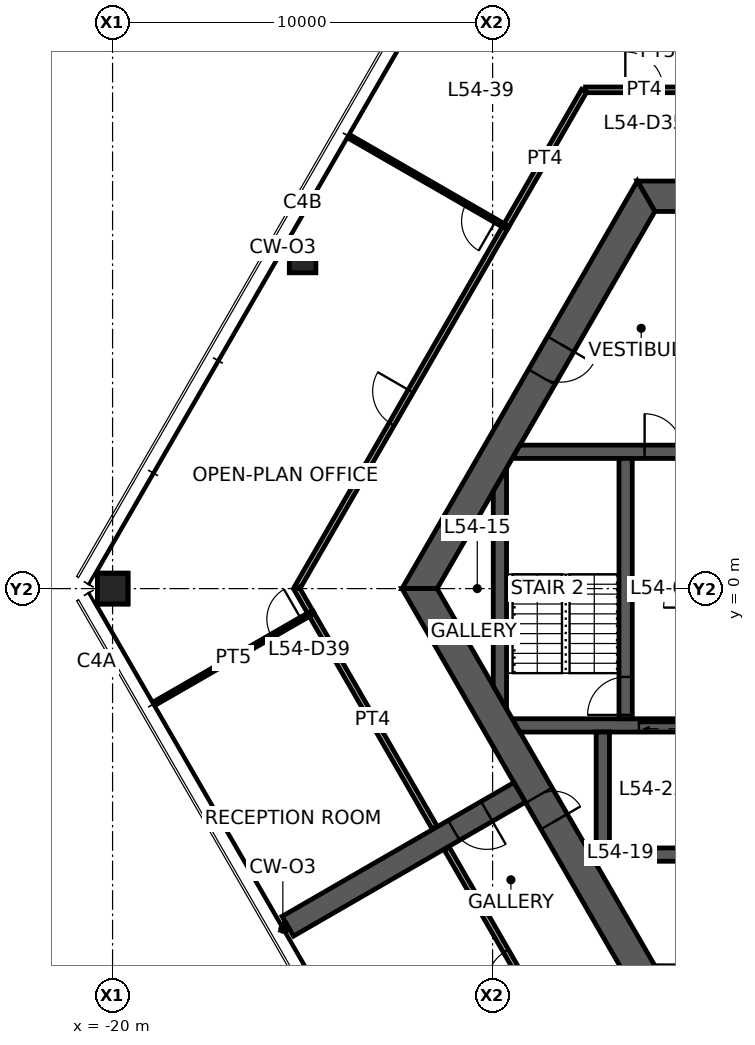
"""IFC4 building model, lengths in metres.
Left out: names, types, materials, properties, quantities, classifications, styles, units other than length and angle.
Written with IfcOpenShell. Run it as: python <this file> out.ifc"""

import sys

from ifc_helpers import new_model, si_unit, direction, frame, frame_2d, origin, origin_2d, place, context, subcontext, project, spatial, polyline, rectangle, hollow_rectangle, outline, extrude, element, fill, save


model = new_model("IFC4")
c1 = context("Model", 3, precision=1e-05, world=origin(), true_north=direction((0.0, 1.0)))
c2 = subcontext(c1, "Body", "Model", "MODEL_VIEW")
j1 = project(units=[si_unit("LENGTHUNIT", "METRE"), si_unit("PLANEANGLEUNIT", "RADIAN")], contexts=[c1])
p1 = place(None, origin())
s1 = spatial("IfcSite", under=j1, at=p1, CompositionType="ELEMENT")
p2 = place(p1, origin())
s2 = spatial("IfcBuilding", under=s1, at=p2, CompositionType="ELEMENT")
p3 = place(p2, frame((0.0, 0.0, 216.7)))
s3 = spatial("IfcBuildingStorey", under=s2, at=p3, CompositionType="ELEMENT", Elevation=216.7)
p4 = place(p3, frame((-20.0, 0.0, 0.0), z_axis=(0.0, 0.0, 1.0), x_axis=(1.0, 0.0, 0.0)))
e1 = element("IfcColumn", 1, at=p4, inside=s3, PredefinedType="COLUMN", context=c2, shape_type="SweptSolid", body=[
    extrude(hollow_rectangle(XDim=0.8, YDim=0.8, WallThickness=0.04, at=origin_2d()), origin(), (0.0, 0.0, 1.0), 3.9),
])
p5 = place(p3, frame((-15.0, 8.66, 0.0), z_axis=(0.0, 0.0, 1.0), x_axis=(1.0, 0.0, 0.0)))
e2 = element("IfcColumn", 2, at=p5, inside=s3, PredefinedType="COLUMN", context=c2, shape_type="SweptSolid", body=[
    extrude(hollow_rectangle(XDim=0.7, YDim=0.7, WallThickness=0.032, at=origin_2d()), origin(), (0.0, 0.0, 1.0), 3.9),
])
p6 = place(p3, frame((5.961, 10.325, 0.0), z_axis=(0.0, 0.0, 1.0), x_axis=(-1.0, 0.0, 0.0)))
e3 = element("IfcWall", 3, at=p6, inside=s3, PredefinedType="SHEAR", context=c2, shape_type="SweptSolid", body=[
    extrude(outline(polyline([(-0.231, -0.4), (4.649, -0.4), (5.549, -0.4), (6.374, -0.4), (7.273, -0.4), (12.153, -0.4), (11.691, 0.4), (7.273, 0.4), (6.374, 0.4), (5.549, 0.4), (4.649, 0.4), (0.231, 0.4), (-0.231, -0.4)])), origin(), (0.0, 0.0, 1.0), 3.9),
])
p7 = place(p6, frame((6.374, 0.0, 0.0)))
e4 = element("IfcOpeningElement", 4, at=p7, cuts=e3, PredefinedType="OPENING", context=c2, shape_type="SweptSolid", body=[
    extrude(rectangle(XDim=0.9, YDim=2.1, at=frame_2d((0.45, 1.05))), frame((0.0, 0.41, 0.0), z_axis=(0.0, -1.0, 0.0), x_axis=(1.0, 0.0, 0.0)), (0.0, 0.0, 1.0), 0.82),
])
p8 = place(p6, frame((4.649, 0.0, 0.0)))
e5 = element("IfcOpeningElement", 5, at=p8, cuts=e3, PredefinedType="OPENING", context=c2, shape_type="SweptSolid", body=[
    extrude(rectangle(XDim=0.9, YDim=2.1, at=frame_2d((0.45, 1.05))), frame((0.0, 0.41, 0.0), z_axis=(0.0, -1.0, 0.0), x_axis=(1.0, 0.0, 0.0)), (0.0, 0.0, 1.0), 0.82),
])
p9 = place(p3, frame((-5.961, 10.325, 0.0), z_axis=(0.0, 0.0, 1.0), x_axis=(-0.500004296715, -0.866022923061, 0.0)))
e6 = element("IfcWall", 6, at=p9, inside=s3, PredefinedType="SHEAR", context=c2, shape_type="SweptSolid", body=[
    extrude(outline(polyline([(-0.231, -0.4), (4.494, -0.4), (5.494, -0.4), (12.153, -0.4), (11.691, 0.4), (5.494, 0.4), (4.494, 0.4), (0.231, 0.4), (-0.231, -0.4)])), origin(), (0.0, 0.0, 1.0), 3.9),
])
p10 = place(p9, frame((4.494, 0.0, 0.0)))
e7 = element("IfcOpeningElement", 7, at=p10, cuts=e6, PredefinedType="OPENING", context=c2, shape_type="SweptSolid", body=[
    extrude(rectangle(XDim=1.0, YDim=2.1, at=frame_2d((0.5, 1.05))), frame((0.0, 0.41, 0.0), z_axis=(0.0, -1.0, 0.0), x_axis=(1.0, 0.0, 0.0)), (0.0, 0.0, 1.0), 0.82),
])
p11 = place(p3, frame((-11.922, 0.0, 0.0), z_axis=(0.0, 0.0, 1.0), x_axis=(0.500004296715, -0.866022923061, 0.0)))
e8 = element("IfcWall", 8, at=p11, inside=s3, PredefinedType="SHEAR", context=c2, shape_type="SweptSolid", body=[
    extrude(outline(polyline([(-0.231, -0.4), (6.281, -0.4), (7.081, -0.4), (12.153, -0.4), (11.691, 0.4), (7.081, 0.4), (6.281, 0.4), (0.231, 0.4), (-0.231, -0.4)])), origin(), (0.0, 0.0, 1.0), 3.9),
])
p12 = place(p11, frame((6.281, 0.0, 0.0)))
e9 = element("IfcOpeningElement", 9, at=p12, cuts=e8, PredefinedType="OPENING", context=c2, shape_type="SweptSolid", body=[
    extrude(rectangle(XDim=0.8, YDim=2.1, at=frame_2d((0.4, 1.05))), frame((0.0, 0.41, 0.0), z_axis=(0.0, -1.0, 0.0), x_axis=(1.0, 0.0, 0.0)), (0.0, 0.0, 1.0), 0.82),
])
p13 = place(p3, frame((-9.288, -5.363, 0.0), z_axis=(0.0, 0.0, 1.0), x_axis=(-0.866027473358, -0.499996415376, 0.0)))
e10 = element("IfcWall", 10, at=p13, inside=s3, PredefinedType="SHEAR", context=c2, shape_type="SweptSolid", body=[
    extrude(rectangle(XDim=7.045, YDim=0.6, at=frame_2d((3.523, 0.0))), origin(), (0.0, 0.0, 1.0), 3.9),
])
p14 = place(p13, frame((1.0, 0.0, 0.0)))
e11 = element("IfcOpeningElement", 11, at=p14, cuts=e10, PredefinedType="OPENING", context=c2, shape_type="SweptSolid", body=[
    extrude(rectangle(XDim=1.0, YDim=2.1, at=frame_2d((0.5, 1.05))), frame((0.0, 0.31, 0.0), z_axis=(0.0, -1.0, 0.0), x_axis=(1.0, 0.0, 0.0)), (0.0, 0.0, 1.0), 0.62),
])
p15 = place(p3, frame((-9.382, 3.6, 0.0), z_axis=(0.0, 0.0, 1.0), x_axis=(1.0, 0.0, 0.0)))
e12 = element("IfcWall", 12, at=p15, inside=s3, PredefinedType="SHEAR", context=c2, shape_type="SweptSolid", body=[
    extrude(outline(polyline([(-0.101, -0.175), (3.382, -0.175), (4.382, -0.175), (5.782, -0.175), (6.882, -0.175), (7.957, -0.175), (7.957, 0.175), (6.882, 0.175), (5.782, 0.175), (4.382, 0.175), (3.382, 0.175), (0.101, 0.175), (-0.101, -0.175)])), origin(), (0.0, 0.0, 1.0), 3.9),
])
p16 = place(p15, frame((3.382, 0.0, 0.0)))
e13 = element("IfcOpeningElement", 13, at=p16, cuts=e12, PredefinedType="OPENING", context=c2, shape_type="SweptSolid", body=[
    extrude(rectangle(XDim=1.0, YDim=2.1, at=frame_2d((0.5, 1.05))), frame((0.0, 0.185, 0.0), z_axis=(0.0, -1.0, 0.0), x_axis=(1.0, 0.0, 0.0)), (0.0, 0.0, 1.0), 0.37),
])
p17 = place(p15, frame((5.782, 0.0, 0.0)))
e14 = element("IfcOpeningElement", 14, at=p17, cuts=e12, PredefinedType="OPENING", context=c2, shape_type="SweptSolid", body=[
    extrude(rectangle(XDim=1.1, YDim=2.1, at=frame_2d((0.55, 1.05))), frame((0.0, 0.185, 0.0), z_axis=(0.0, -1.0, 0.0), x_axis=(1.0, 0.0, 0.0)), (0.0, 0.0, 1.0), 0.37),
])
p18 = place(p3, frame((-9.382, -3.6, 0.0), z_axis=(0.0, 0.0, 1.0), x_axis=(1.0, 0.0, 0.0)))
e15 = element("IfcWall", 15, at=p18, inside=s3, PredefinedType="SHEAR", context=c2, shape_type="SweptSolid", body=[
    extrude(outline(polyline([(0.101, -0.175), (3.232, -0.175), (4.532, -0.175), (5.782, -0.175), (6.882, -0.175), (7.957, -0.175), (7.957, 0.175), (6.882, 0.175), (5.782, 0.175), (4.532, 0.175), (3.232, 0.175), (-0.101, 0.175), (0.101, -0.175)])), origin(), (0.0, 0.0, 1.0), 3.9),
])
p19 = place(p18, frame((5.782, 0.0, 0.0)))
e16 = element("IfcOpeningElement", 16, at=p19, cuts=e15, PredefinedType="OPENING", context=c2, shape_type="SweptSolid", body=[
    extrude(rectangle(XDim=1.1, YDim=2.1, at=frame_2d((0.55, 1.05))), frame((0.0, 0.185, 0.0), z_axis=(0.0, -1.0, 0.0), x_axis=(1.0, 0.0, 0.0)), (0.0, 0.0, 1.0), 0.37),
])
p20 = place(p18, frame((3.232, 0.0, 0.0)))
e17 = element("IfcOpeningElement", 17, at=p20, cuts=e15, PredefinedType="OPENING", context=c2, shape_type="SweptSolid", body=[
    extrude(rectangle(XDim=1.3, YDim=2.1, at=frame_2d((0.65, 1.05))), frame((0.0, 0.185, 0.0), z_axis=(0.0, -1.0, 0.0), x_axis=(1.0, 0.0, 0.0)), (0.0, 0.0, 1.0), 0.37),
])
p21 = place(p3, frame((-6.5, -3.425, 0.0), z_axis=(0.0, 0.0, 1.0), x_axis=(0.0, 1.0, 0.0)))
e18 = element("IfcWall", 18, at=p21, inside=s3, PredefinedType="SHEAR", context=c2, shape_type="SweptSolid", body=[
    extrude(rectangle(XDim=6.85, YDim=0.35, at=frame_2d((3.425, 0.0))), origin(), (0.0, 0.0, 1.0), 3.9),
])
p22 = place(p21, frame((0.1, 0.0, 0.0)))
e19 = element("IfcOpeningElement", 19, at=p22, cuts=e18, PredefinedType="OPENING", context=c2, shape_type="SweptSolid", body=[
    extrude(rectangle(XDim=1.0, YDim=2.1, at=frame_2d((0.5, 1.05))), frame((0.0, 0.185, 0.0), z_axis=(0.0, -1.0, 0.0), x_axis=(1.0, 0.0, 0.0)), (0.0, 0.0, 1.0), 0.37),
])
p23 = place(p3, frame((-7.275, -7.0, 0.0), z_axis=(0.0, 0.0, 1.0), x_axis=(1.0, 0.0, 0.0)))
e20 = element("IfcWall", 20, at=p23, inside=s3, PredefinedType="SHEAR", context=c2, shape_type="SweptSolid", body=[
    extrude(rectangle(XDim=2.6, YDim=0.35, at=frame_2d((1.3, 0.0))), origin(), (0.0, 0.0, 1.0), 3.9),
])
p24 = place(p3, frame((-7.1, -3.775, 0.0), z_axis=(0.0, 0.0, 1.0), x_axis=(0.0, -1.0, 0.0)))
e21 = element("IfcWall", 21, at=p24, inside=s3, PredefinedType="SHEAR", context=c2, shape_type="SweptSolid", body=[
    extrude(rectangle(XDim=3.05, YDim=0.35, at=frame_2d((1.525, 0.0))), origin(), (0.0, 0.0, 1.0), 3.9),
])
p25 = place(p3, frame((-9.808, -2.862, 0.0), z_axis=(0.0, 0.0, 1.0), x_axis=(0.0, 1.0, 0.0)))
e22 = element("IfcWall", 22, at=p25, inside=s3, PredefinedType="SHEAR", context=c2, shape_type="SweptSolid", body=[
    extrude(outline(polyline([(-0.303, -0.175), (6.028, -0.175), (5.421, 0.175), (0.303, 0.175), (-0.303, -0.175)])), origin(), (0.0, 0.0, 1.0), 3.9),
])
p26 = place(p3, frame((-7.555, 13.125, 0.0), z_axis=(0.0, 0.0, 1.0), x_axis=(1.0, 0.0, 0.0)))
e23 = element("IfcWall", 23, at=p26, inside=s3, PredefinedType="PARTITIONING", context=c2, shape_type="SweptSolid", body=[
    extrude(rectangle(XDim=3.094, YDim=0.15, at=frame_2d((1.547, 0.0))), origin(), (0.0, 0.0, 1.0), 2.95),
])
p27 = place(p26, frame((1.047, 0.0, 0.0)))
e24 = element("IfcOpeningElement", 24, at=p27, cuts=e23, PredefinedType="OPENING", context=c2, shape_type="SweptSolid", body=[
    extrude(rectangle(XDim=1.0, YDim=2.1, at=frame_2d((0.5, 1.05))), frame((0.0, 0.085, 0.0), z_axis=(0.0, -1.0, 0.0), x_axis=(1.0, 0.0, 0.0)), (0.0, 0.0, 1.0), 0.17),
])
p28 = place(p3, frame((-9.661, 9.516, 0.0), z_axis=(0.0, 0.0, 1.0), x_axis=(0.499997836828, 0.866026652689, 0.0)))
e25 = element("IfcWall", 25, at=p28, inside=s3, PredefinedType="PARTITIONING", context=c2, shape_type="SweptSolid", body=[
    extrude(rectangle(XDim=4.144, YDim=0.15, at=frame_2d((2.072, 0.0))), origin(), (0.0, 0.0, 1.0), 2.95),
])
p29 = place(p3, frame((-11.527, -6.285, 0.0), z_axis=(0.0, 0.0, 1.0), x_axis=(-0.500003537243, 0.866023361547, 0.0)))
e26 = element("IfcWall", 26, at=p29, inside=s3, PredefinedType="PARTITIONING", context=c2, shape_type="SweptSolid", body=[
    extrude(rectangle(XDim=6.516, YDim=0.15, at=frame_2d((3.258, 0.0))), origin(), (0.0, 0.0, 1.0), 2.95),
])
p30 = place(p3, frame((-15.156, 0.0, 0.0), z_axis=(0.0, 0.0, 1.0), x_axis=(0.500006847747, 0.8660214502, 0.0)))
e27 = element("IfcWall", 27, at=p30, inside=s3, PredefinedType="PARTITIONING", context=c2, shape_type="SweptSolid", body=[
    extrude(rectangle(XDim=10.998, YDim=0.15, at=frame_2d((5.499, 0.0))), origin(), (0.0, 0.0, 1.0), 2.95),
])
p31 = place(p30, frame((4.999, 0.0, 0.0)))
e28 = element("IfcOpeningElement", 28, at=p31, cuts=e27, PredefinedType="OPENING", context=c2, shape_type="SweptSolid", body=[
    extrude(rectangle(XDim=1.0, YDim=2.1, at=frame_2d((0.5, 1.05))), frame((0.0, 0.085, 0.0), z_axis=(0.0, -1.0, 0.0), x_axis=(1.0, 0.0, 0.0)), (0.0, 0.0, 1.0), 0.17),
])
p32 = place(p3, frame((-14.78, -0.651, 0.0), z_axis=(0.0, 0.0, 1.0), x_axis=(-0.500088105676, 0.865974529972, 0.0)))
e29 = element("IfcWall", 29, at=p32, inside=s3, PredefinedType="PARTITIONING", context=c2, shape_type="SweptSolid", body=[
    extrude(rectangle(XDim=0.751, YDim=0.15, at=frame_2d((0.375, 0.0))), origin(), (0.0, 0.0, 1.0), 2.95),
])
p33 = place(p3, frame((-9.656, 9.524, 0.0), z_axis=(0.0, 0.0, 1.0), x_axis=(-0.866526579402, 0.499130931911, 0.0)))
e30 = element("IfcWall", 30, at=p33, inside=s3, PredefinedType="PARTITIONING", context=c2, shape_type="SweptSolid", body=[
    extrude(rectangle(XDim=4.705, YDim=0.1, at=frame_2d((2.353, 0.0))), origin(), (0.0, 0.0, 1.0), 2.95),
])
p34 = place(p33, frame((0.3, 0.0, 0.0)))
e31 = element("IfcOpeningElement", 31, at=p34, cuts=e30, PredefinedType="OPENING", context=c2, shape_type="SweptSolid", body=[
    extrude(rectangle(XDim=0.9, YDim=2.1, at=frame_2d((0.45, 1.05))), frame((0.0, 0.06, 0.0), z_axis=(0.0, -1.0, 0.0), x_axis=(1.0, 0.0, 0.0)), (0.0, 0.0, 1.0), 0.12),
])
p35 = place(p3, frame((-18.857, -3.0, 0.0), z_axis=(0.0, 0.0, 1.0), x_axis=(0.866504138439, 0.499169888984, 0.0)))
e32 = element("IfcWall", 32, at=p35, inside=s3, PredefinedType="PARTITIONING", context=c2, shape_type="SweptSolid", body=[
    extrude(rectangle(XDim=4.706, YDim=0.1, at=frame_2d((2.353, 0.0))), origin(), (0.0, 0.0, 1.0), 2.95),
])
p36 = place(p35, frame((3.506, 0.0, 0.0)))
e33 = element("IfcOpeningElement", 33, at=p36, cuts=e32, PredefinedType="OPENING", context=c2, shape_type="SweptSolid", body=[
    extrude(rectangle(XDim=0.9, YDim=2.1, at=frame_2d((0.45, 1.05))), frame((0.0, 0.06, 0.0), z_axis=(0.0, -1.0, 0.0), x_axis=(1.0, 0.0, 0.0)), (0.0, 0.0, 1.0), 0.12),
])
p37 = place(p3, frame((-7.589, -13.105, 0.0), z_axis=(0.0, 0.0, 1.0), x_axis=(-0.499986333712, 0.866033293876, 0.0)))
e34 = element("IfcWall", 34, at=p37, inside=s3, PredefinedType="PARTITIONING", context=c2, shape_type="SweptSolid", body=[
    extrude(rectangle(XDim=7.235, YDim=0.15, at=frame_2d((3.617, 0.0))), origin(), (0.0, 0.0, 1.0), 2.95),
])
p38 = place(p37, frame((3.117, 0.0, 0.0)))
e35 = element("IfcOpeningElement", 35, at=p38, cuts=e34, PredefinedType="OPENING", context=c2, shape_type="SweptSolid", body=[
    extrude(rectangle(XDim=1.0, YDim=2.1, at=frame_2d((0.5, 1.05))), frame((0.0, 0.085, 0.0), z_axis=(0.0, -1.0, 0.0), x_axis=(1.0, 0.0, 0.0)), (0.0, 0.0, 1.0), 0.17),
])
p39 = place(p3, frame((-15.39, -8.885, 0.0), z_axis=(0.0, 0.0, 1.0), x_axis=(-0.866472036435, -0.499225610396, 0.0)))
e36 = element("IfcWall", 36, at=p39, inside=s3, PredefinedType="PARTITIONING", context=c2, shape_type="SweptSolid", body=[
    extrude(rectangle(XDim=0.085, YDim=0.175, at=frame_2d((0.042, 0.0))), origin(), (0.0, 0.0, 1.0), 3.9),
])
p40 = place(p12, origin())
e37 = element("IfcDoor", 37, at=p40, inside=s3, OperationType="SINGLE_SWING_RIGHT", PredefinedType="DOOR", context=c2, shape_type="SweptSolid", body=[
    extrude(rectangle(XDim=0.8, YDim=2.1, at=frame_2d((0.4, 1.05))), frame((0.0, 0.025, 0.0), z_axis=(0.0, -1.0, 0.0), x_axis=(1.0, 0.0, 0.0)), (0.0, 0.0, 1.0), 0.05),
])
fill(e9, e37)
p41 = place(p10, origin())
e38 = element("IfcDoor", 38, at=p41, inside=s3, OperationType="SINGLE_SWING_LEFT", PredefinedType="DOOR", context=c2, shape_type="SweptSolid", body=[
    extrude(rectangle(XDim=1.0, YDim=2.1, at=frame_2d((0.5, 1.05))), frame((0.0, 0.025, 0.0), z_axis=(0.0, -1.0, 0.0), x_axis=(1.0, 0.0, 0.0)), (0.0, 0.0, 1.0), 0.05),
])
fill(e7, e38)
p42 = place(p22, origin())
e39 = element("IfcDoor", 39, at=p42, inside=s3, OperationType="SINGLE_SWING_LEFT", PredefinedType="DOOR", context=c2, shape_type="SweptSolid", body=[
    extrude(rectangle(XDim=1.0, YDim=2.1, at=frame_2d((0.5, 1.05))), frame((0.0, 0.025, 0.0), z_axis=(0.0, -1.0, 0.0), x_axis=(1.0, 0.0, 0.0)), (0.0, 0.0, 1.0), 0.05),
])
fill(e19, e39)
p43 = place(p16, origin())
e40 = element("IfcDoor", 40, at=p43, inside=s3, OperationType="SINGLE_SWING_LEFT", PredefinedType="DOOR", context=c2, shape_type="SweptSolid", body=[
    extrude(rectangle(XDim=1.0, YDim=2.1, at=frame_2d((0.5, 1.05))), frame((0.0, 0.025, 0.0), z_axis=(0.0, -1.0, 0.0), x_axis=(1.0, 0.0, 0.0)), (0.0, 0.0, 1.0), 0.05),
])
fill(e13, e40)
p44 = place(p14, origin())
e41 = element("IfcDoor", 41, at=p44, inside=s3, OperationType="SINGLE_SWING_LEFT", PredefinedType="DOOR", context=c2, shape_type="SweptSolid", body=[
    extrude(rectangle(XDim=1.0, YDim=2.1, at=frame_2d((0.5, 1.05))), frame((0.0, 0.025, 0.0), z_axis=(0.0, -1.0, 0.0), x_axis=(1.0, 0.0, 0.0)), (0.0, 0.0, 1.0), 0.05),
])
fill(e11, e41)
p45 = place(p27, origin())
e42 = element("IfcDoor", 42, at=p45, inside=s3, OperationType="SINGLE_SWING_LEFT", PredefinedType="DOOR", context=c2, shape_type="SweptSolid", body=[
    extrude(rectangle(XDim=1.0, YDim=2.1, at=frame_2d((0.5, 1.05))), frame((0.0, 0.025, 0.0), z_axis=(0.0, -1.0, 0.0), x_axis=(1.0, 0.0, 0.0)), (0.0, 0.0, 1.0), 0.05),
])
fill(e24, e42)
p46 = place(p31, origin())
e43 = element("IfcDoor", 43, at=p46, inside=s3, OperationType="SINGLE_SWING_RIGHT", PredefinedType="DOOR", context=c2, shape_type="SweptSolid", body=[
    extrude(rectangle(XDim=1.0, YDim=2.1, at=frame_2d((0.5, 1.05))), frame((0.0, 0.025, 0.0), z_axis=(0.0, -1.0, 0.0), x_axis=(1.0, 0.0, 0.0)), (0.0, 0.0, 1.0), 0.05),
])
fill(e28, e43)
p47 = place(p34, origin())
e44 = element("IfcDoor", 44, at=p47, inside=s3, OperationType="SINGLE_SWING_LEFT", PredefinedType="DOOR", context=c2, shape_type="SweptSolid", body=[
    extrude(rectangle(XDim=0.9, YDim=2.1, at=frame_2d((0.45, 1.05))), frame((0.0, 0.025, 0.0), z_axis=(0.0, -1.0, 0.0), x_axis=(1.0, 0.0, 0.0)), (0.0, 0.0, 1.0), 0.05),
])
fill(e31, e44)
p48 = place(p36, origin())
e45 = element("IfcDoor", 45, at=p48, inside=s3, OperationType="SINGLE_SWING_RIGHT", PredefinedType="DOOR", context=c2, shape_type="SweptSolid", body=[
    extrude(rectangle(XDim=0.9, YDim=2.1, at=frame_2d((0.45, 1.05))), frame((0.0, 0.025, 0.0), z_axis=(0.0, -1.0, 0.0), x_axis=(1.0, 0.0, 0.0)), (0.0, 0.0, 1.0), 0.05),
])
fill(e33, e45)
p49 = place(p38, origin())
e46 = element("IfcDoor", 46, at=p49, inside=s3, OperationType="SINGLE_SWING_LEFT", PredefinedType="DOOR", context=c2, shape_type="SweptSolid", body=[
    extrude(rectangle(XDim=1.0, YDim=2.1, at=frame_2d((0.5, 1.05))), frame((0.0, 0.025, 0.0), z_axis=(0.0, -1.0, 0.0), x_axis=(1.0, 0.0, 0.0)), (0.0, 0.0, 1.0), 0.05),
])
fill(e35, e46)
p50 = place(p20, origin())
e47 = element("IfcDoor", 47, at=p50, inside=s3, OperationType="DOUBLE_DOOR_SLIDING", PredefinedType="DOOR", context=c2, shape_type="SweptSolid", body=[
    extrude(rectangle(XDim=1.3, YDim=2.1, at=frame_2d((0.65, 1.05))), frame((0.0, 0.025, 0.0), z_axis=(0.0, -1.0, 0.0), x_axis=(1.0, 0.0, 0.0)), (0.0, 0.0, 1.0), 0.05),
])
fill(e17, e47)
save(model, sys.argv[1])
